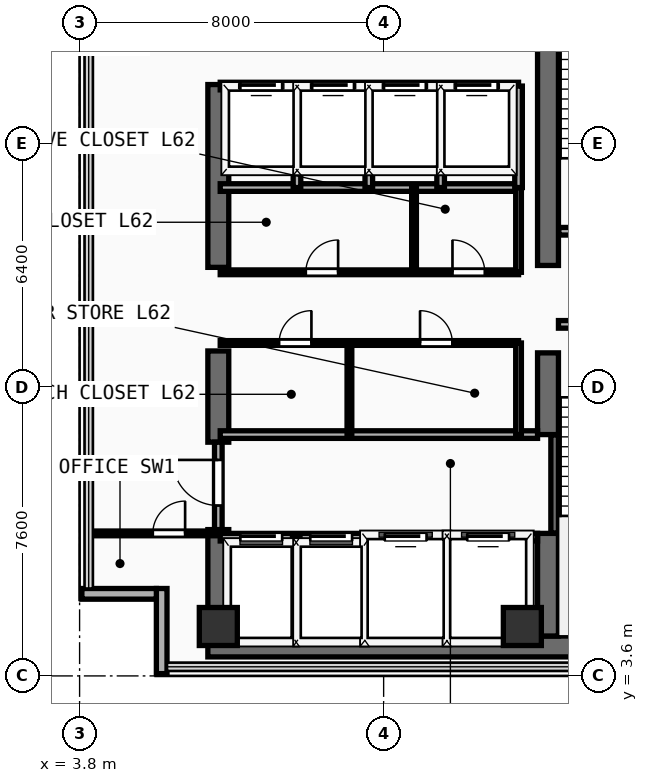
"""IFC4 building model, lengths in metres.
Left out: names, types, materials, properties, quantities, classifications, styles, units other than length and angle.
Written with IfcOpenShell. Run it as: python <this file> out.ifc"""

import sys

from ifc_helpers import new_model, si_unit, direction, frame, frame_2d, origin, origin_2d, place, context, subcontext, project, spatial, rectangle, extrude, element, fill, save


model = new_model("IFC4")
c1 = context("Model", 3, precision=1e-05, world=origin(), true_north=direction((0.0, 1.0)))
c2 = subcontext(c1, "Body", "Model", "MODEL_VIEW")
j1 = project(units=[si_unit("LENGTHUNIT", "METRE"), si_unit("PLANEANGLEUNIT", "RADIAN")], contexts=[c1])
p1 = place(None, origin())
s1 = spatial("IfcSite", under=j1, at=p1, CompositionType="ELEMENT")
p2 = place(p1, origin())
s2 = spatial("IfcBuilding", under=s1, at=p2, CompositionType="ELEMENT")
p3 = place(p2, frame((0.0, 0.0, 242.5)))
s3 = spatial("IfcBuildingStorey", under=s2, at=p3, CompositionType="ELEMENT", Elevation=242.5)
p4 = place(p3, frame((7.175, 4.375, 0.0), z_axis=(0.0, 0.0, 1.0), x_axis=(1.0, 0.0, 0.0)))
e1 = element("IfcWall", 1, at=p4, inside=s3, PredefinedType="SHEAR", context=c2, shape_type="SweptSolid", body=[
    extrude(rectangle(XDim=13.9, YDim=0.55, at=frame_2d((6.95, 0.0))), origin(), (0.0, 0.0, 1.0), 3.56),
])
p5 = place(p3, frame((7.45, 4.65, 0.0), z_axis=(0.0, 0.0, 1.0), x_axis=(0.0, 1.0, 0.0)))
e2 = element("IfcWall", 2, at=p5, inside=s3, PredefinedType="SHEAR", context=c2, shape_type="SweptSolid", body=[
    extrude(rectangle(XDim=2.8, YDim=0.55, at=frame_2d((1.4, 0.0))), origin(), (0.0, 0.0, 1.0), 3.56),
])
p6 = place(p3, frame((7.45, 9.75, 0.0), z_axis=(0.0, 0.0, 1.0), x_axis=(0.0, 1.0, 0.0)))
e3 = element("IfcWall", 3, at=p6, inside=s3, PredefinedType="SHEAR", context=c2, shape_type="SweptSolid", body=[
    extrude(rectangle(XDim=2.4, YDim=0.55, at=frame_2d((1.2, 0.0))), origin(), (0.0, 0.0, 1.0), 3.56),
])
p7 = place(p3, frame((7.45, 14.35, 0.0), z_axis=(0.0, 0.0, 1.0), x_axis=(0.0, 1.0, 0.0)))
e4 = element("IfcWall", 4, at=p7, inside=s3, PredefinedType="SHEAR", context=c2, shape_type="SweptSolid", body=[
    extrude(rectangle(XDim=4.81, YDim=0.55, at=frame_2d((2.405, 0.0))), origin(), (0.0, 0.0, 1.0), 3.56),
])
p8 = place(p3, frame((16.125, 4.65, 0.0), z_axis=(0.0, 0.0, 1.0), x_axis=(0.0, 1.0, 0.0)))
e5 = element("IfcWall", 5, at=p8, inside=s3, PredefinedType="SHEAR", context=c2, shape_type="SweptSolid", body=[
    extrude(rectangle(XDim=2.7, YDim=0.55, at=frame_2d((1.35, 0.0))), origin(), (0.0, 0.0, 1.0), 3.56),
])
p9 = place(p3, frame((16.125, 9.95, 0.0), z_axis=(0.0, 0.0, 1.0), x_axis=(0.0, 1.0, 0.0)))
e6 = element("IfcWall", 6, at=p9, inside=s3, PredefinedType="SHEAR", context=c2, shape_type="SweptSolid", body=[
    extrude(rectangle(XDim=2.15, YDim=0.55, at=frame_2d((1.075, 0.0))), origin(), (0.0, 0.0, 1.0), 3.56),
])
p10 = place(p3, frame((16.125, 14.4, 0.0), z_axis=(0.0, 0.0, 1.0), x_axis=(0.0, 1.0, 0.0)))
e7 = element("IfcWall", 7, at=p10, inside=s3, PredefinedType="SHEAR", context=c2, shape_type="SweptSolid", body=[
    extrude(rectangle(XDim=9.1, YDim=0.55, at=frame_2d((4.55, 0.0))), origin(), (0.0, 0.0, 1.0), 3.56),
])
for number, where, z_axis, x_axis in (
    (8, (7.45, 4.9, 0.0), (0.0, 0.0, 1.0), (1.0, 0.0, 0.0)),
    (9, (15.45, 4.9, 0.0), (0.0, 0.0, 1.0), (1.0, 0.0, 0.0)),
):
    element("IfcColumn", number, at=place(p3, frame(where, z_axis=z_axis, x_axis=x_axis)), inside=s3, PredefinedType="COLUMN", context=c2, shape_type="SweptSolid", body=[
        extrude(rectangle(XDim=1.0, YDim=1.0, at=origin_2d()), origin(), (0.0, 0.0, 1.0), 3.56),
    ])
p11 = place(p3, frame((5.96, 3.66, 0.0), z_axis=(0.0, 0.0, 1.0), x_axis=(0.0, 1.0, 0.0)))
e10 = element("IfcWall", 10, at=p11, inside=s3, PredefinedType="SOLIDWALL", context=c2, shape_type="SweptSolid", body=[
    extrude(rectangle(XDim=2.24, YDim=0.28, at=frame_2d((1.12, 0.0))), origin(), (0.0, 0.0, 1.0), 3.56),
])
p12 = place(p3, frame((3.86, 5.76, 0.0), z_axis=(0.0, 0.0, 1.0), x_axis=(1.0, 0.0, 0.0)))
e11 = element("IfcWall", 11, at=p12, inside=s3, PredefinedType="SOLIDWALL", context=c2, shape_type="SweptSolid", body=[
    extrude(rectangle(XDim=1.96, YDim=0.28, at=frame_2d((0.98, 0.0))), origin(), (0.0, 0.0, 1.0), 3.56),
])
p13 = place(p3, frame((16.3, 7.36, 0.0), z_axis=(0.0, 0.0, 1.0), x_axis=(0.0, 1.0, 0.0)))
e12 = element("IfcWall", 12, at=p13, inside=s3, PredefinedType="SHEAR", context=c2, shape_type="SweptSolid", body=[
    extrude(rectangle(XDim=2.58, YDim=0.2, at=frame_2d((1.29, 0.0))), origin(), (0.0, 0.0, 1.0), 3.56),
])
p14 = place(p3, frame((16.4, 12.85, 0.0), z_axis=(0.0, 0.0, 1.0), x_axis=(1.0, 0.0, 0.0)))
e13 = element("IfcWall", 13, at=p14, inside=s3, PredefinedType="PARTITIONING", context=c2, shape_type="SweptSolid", body=[
    extrude(rectangle(XDim=3.96, YDim=0.2, at=frame_2d((1.98, 0.0))), origin(), (0.0, 0.0, 1.0), 3.56),
])
p15 = place(p14, frame((1.304, 0.0, 0.0)))
e14 = element("IfcOpeningElement", 14, at=p15, cuts=e13, PredefinedType="OPENING", context=c2, shape_type="SweptSolid", body=[
    extrude(rectangle(XDim=1.1, YDim=2.2, at=frame_2d((0.55, 1.1))), frame((0.0, 0.11, 0.0), z_axis=(0.0, -1.0, 0.0), x_axis=(1.0, 0.0, 0.0)), (0.0, 0.0, 1.0), 0.22),
])
p16 = place(p3, frame((16.41, 15.3, 0.0), z_axis=(0.0, 0.0, 1.0), x_axis=(1.0, 0.0, 0.0)))
e15 = element("IfcWall", 15, at=p16, inside=s3, PredefinedType="PARTITIONING", context=c2, shape_type="SweptSolid", body=[
    extrude(rectangle(XDim=3.95, YDim=0.2, at=frame_2d((1.975, 0.0))), origin(), (0.0, 0.0, 1.0), 3.56),
])
p17 = place(p16, frame((1.294, 0.0, 0.0)))
e16 = element("IfcOpeningElement", 16, at=p17, cuts=e15, PredefinedType="OPENING", context=c2, shape_type="SweptSolid", body=[
    extrude(rectangle(XDim=1.1, YDim=2.2, at=frame_2d((0.55, 1.1))), frame((0.0, 0.11, 0.0), z_axis=(0.0, -1.0, 0.0), x_axis=(1.0, 0.0, 0.0)), (0.0, 0.0, 1.0), 0.22),
])
p18 = place(p3, frame((7.5, 7.25, 0.0), z_axis=(0.0, 0.0, 1.0), x_axis=(1.0, 0.0, 0.0)))
e17 = element("IfcWall", 17, at=p18, inside=s3, PredefinedType="PARTITIONING", context=c2, shape_type="SweptSolid", body=[
    extrude(rectangle(XDim=8.35, YDim=0.2, at=frame_2d((4.175, 0.0))), origin(), (0.0, 0.0, 1.0), 3.56),
])
p19 = place(p18, frame((0.53, 0.0, 0.0)))
e18 = element("IfcOpeningElement", 18, at=p19, cuts=e17, PredefinedType="OPENING", context=c2, shape_type="SweptSolid", body=[
    extrude(rectangle(XDim=1.1, YDim=2.2, at=frame_2d((0.55, 1.1))), frame((0.0, 0.11, 0.0), z_axis=(0.0, -1.0, 0.0), x_axis=(1.0, 0.0, 0.0)), (0.0, 0.0, 1.0), 0.22),
])
p20 = place(p18, frame((2.37, 0.0, 0.0)))
e19 = element("IfcOpeningElement", 19, at=p20, cuts=e17, PredefinedType="OPENING", context=c2, shape_type="SweptSolid", body=[
    extrude(rectangle(XDim=1.1, YDim=2.2, at=frame_2d((0.55, 1.1))), frame((0.0, 0.11, 0.0), z_axis=(0.0, -1.0, 0.0), x_axis=(1.0, 0.0, 0.0)), (0.0, 0.0, 1.0), 0.22),
])
p21 = place(p18, frame((4.33, 0.0, 0.0)))
e20 = element("IfcOpeningElement", 20, at=p21, cuts=e17, PredefinedType="OPENING", context=c2, shape_type="SweptSolid", body=[
    extrude(rectangle(XDim=1.1, YDim=2.2, at=frame_2d((0.55, 1.1))), frame((0.0, 0.11, 0.0), z_axis=(0.0, -1.0, 0.0), x_axis=(1.0, 0.0, 0.0)), (0.0, 0.0, 1.0), 0.22),
])
p22 = place(p18, frame((6.5, 0.0, 0.0)))
e21 = element("IfcOpeningElement", 21, at=p22, cuts=e17, PredefinedType="OPENING", context=c2, shape_type="SweptSolid", body=[
    extrude(rectangle(XDim=1.1, YDim=2.2, at=frame_2d((0.55, 1.1))), frame((0.0, 0.11, 0.0), z_axis=(0.0, -1.0, 0.0), x_axis=(1.0, 0.0, 0.0)), (0.0, 0.0, 1.0), 0.22),
])
p23 = place(p3, frame((7.5, 9.95, 0.0), z_axis=(0.0, 0.0, 1.0), x_axis=(1.0, 0.0, 0.0)))
e22 = element("IfcWall", 22, at=p23, inside=s3, PredefinedType="PARTITIONING", context=c2, shape_type="SweptSolid", body=[
    extrude(rectangle(XDim=8.35, YDim=0.2, at=frame_2d((4.175, 0.0))), origin(), (0.0, 0.0, 1.0), 3.56),
])
for number, where, z_axis, x_axis in (
    (23, (9.5, 4.45, 0.0), (0.0, 0.0, 1.0), (0.0, 1.0, 0.0)),
    (24, (11.36, 4.45, 0.0), (0.0, 0.0, 1.0), (0.0, 1.0, 0.0)),
    (25, (13.46, 4.45, 0.0), (0.0, 0.0, 1.0), (0.0, 1.0, 0.0)),
):
    element("IfcWall", number, at=place(p3, frame(where, z_axis=z_axis, x_axis=x_axis)), inside=s3, PredefinedType="PARTITIONING", context=c2, shape_type="SweptSolid", body=[
        extrude(rectangle(XDim=2.8, YDim=0.2, at=frame_2d((1.4, 0.0))), origin(), (0.0, 0.0, 1.0), 3.56),
    ])
p24 = place(p3, frame((7.45, 7.45, 0.0), z_axis=(0.0, 0.0, 1.0), x_axis=(0.0, 1.0, 0.0)))
e26 = element("IfcWall", 26, at=p24, inside=s3, PredefinedType="PARTITIONING", context=c2, shape_type="SweptSolid", body=[
    extrude(rectangle(XDim=2.3, YDim=0.2, at=frame_2d((1.15, 0.0))), origin(), (0.0, 0.0, 1.0), 2.54),
])
p25 = place(p24, frame((0.633, 0.0, 0.0)))
e27 = element("IfcOpeningElement", 27, at=p25, cuts=e26, PredefinedType="OPENING", context=c2, shape_type="SweptSolid", body=[
    extrude(rectangle(XDim=1.2, YDim=2.25, at=frame_2d((0.6, 1.125))), frame((0.0, 0.11, 0.0), z_axis=(0.0, -1.0, 0.0), x_axis=(1.0, 0.0, 0.0)), (0.0, 0.0, 1.0), 0.22),
])
p26 = place(p3, frame((7.5, 16.45, 0.0), z_axis=(0.0, 0.0, 1.0), x_axis=(1.0, 0.0, 0.0)))
e28 = element("IfcWall", 28, at=p26, inside=s3, PredefinedType="PARTITIONING", context=c2, shape_type="SweptSolid", body=[
    extrude(rectangle(XDim=7.85, YDim=0.2, at=frame_2d((3.925, 0.0))), origin(), (0.0, 0.0, 1.0), 3.56),
])
p27 = place(p3, frame((7.5, 12.36, 0.0), z_axis=(0.0, 0.0, 1.0), x_axis=(1.0, 0.0, 0.0)))
e29 = element("IfcWall", 29, at=p27, inside=s3, PredefinedType="PARTITIONING", context=c2, shape_type="SweptSolid", body=[
    extrude(rectangle(XDim=7.85, YDim=0.125, at=frame_2d((3.925, 0.0))), origin(), (0.0, 0.0, 1.0), 3.56),
])
p28 = place(p27, frame((1.55, 0.0, 0.0)))
e30 = element("IfcOpeningElement", 30, at=p28, cuts=e29, PredefinedType="OPENING", context=c2, shape_type="SweptSolid", body=[
    extrude(rectangle(XDim=0.85, YDim=2.15, at=frame_2d((0.425, 1.075))), frame((0.0, 0.073, 0.0), z_axis=(0.0, -1.0, 0.0), x_axis=(1.0, 0.0, 0.0)), (0.0, 0.0, 1.0), 0.145),
])
p29 = place(p27, frame((5.258, 0.0, 0.0)))
e31 = element("IfcOpeningElement", 31, at=p29, cuts=e29, PredefinedType="OPENING", context=c2, shape_type="SweptSolid", body=[
    extrude(rectangle(XDim=0.85, YDim=2.15, at=frame_2d((0.425, 1.075))), frame((0.0, 0.073, 0.0), z_axis=(0.0, -1.0, 0.0), x_axis=(1.0, 0.0, 0.0)), (0.0, 0.0, 1.0), 0.145),
])
p30 = place(p3, frame((7.5, 14.22, 0.0), z_axis=(0.0, 0.0, 1.0), x_axis=(1.0, 0.0, 0.0)))
e32 = element("IfcWall", 32, at=p30, inside=s3, PredefinedType="PARTITIONING", context=c2, shape_type="SweptSolid", body=[
    extrude(rectangle(XDim=7.85, YDim=0.125, at=frame_2d((3.925, 0.0))), origin(), (0.0, 0.0, 1.0), 3.56),
])
p31 = place(p30, frame((2.252, 0.0, 0.0)))
e33 = element("IfcOpeningElement", 33, at=p31, cuts=e32, PredefinedType="OPENING", context=c2, shape_type="SweptSolid", body=[
    extrude(rectangle(XDim=0.85, YDim=2.15, at=frame_2d((0.425, 1.075))), frame((0.0, 0.073, 0.0), z_axis=(0.0, -1.0, 0.0), x_axis=(1.0, 0.0, 0.0)), (0.0, 0.0, 1.0), 0.145),
])
p32 = place(p30, frame((6.111, 0.0, 0.0)))
e34 = element("IfcOpeningElement", 34, at=p32, cuts=e32, PredefinedType="OPENING", context=c2, shape_type="SweptSolid", body=[
    extrude(rectangle(XDim=0.85, YDim=2.15, at=frame_2d((0.425, 1.075))), frame((0.0, 0.073, 0.0), z_axis=(0.0, -1.0, 0.0), x_axis=(1.0, 0.0, 0.0)), (0.0, 0.0, 1.0), 0.145),
])
p33 = place(p3, frame((15.35, 9.95, 0.0), z_axis=(0.0, 0.0, 1.0), x_axis=(0.0, 1.0, 0.0)))
e35 = element("IfcWall", 35, at=p33, inside=s3, PredefinedType="PARTITIONING", context=c2, shape_type="SweptSolid", body=[
    extrude(rectangle(XDim=2.41, YDim=0.15, at=frame_2d((1.205, 0.0))), origin(), (0.0, 0.0, 1.0), 3.56),
])
p34 = place(p3, frame((15.35, 14.22, 0.0), z_axis=(0.0, 0.0, 1.0), x_axis=(0.0, 1.0, 0.0)))
e36 = element("IfcWall", 36, at=p34, inside=s3, PredefinedType="PARTITIONING", context=c2, shape_type="SweptSolid", body=[
    extrude(rectangle(XDim=2.23, YDim=0.15, at=frame_2d((1.115, 0.0))), origin(), (0.0, 0.0, 1.0), 3.56),
])
p35 = place(p3, frame((10.9, 9.95, 0.0), z_axis=(0.0, 0.0, 1.0), x_axis=(0.0, 1.0, 0.0)))
e37 = element("IfcWall", 37, at=p35, inside=s3, PredefinedType="PARTITIONING", context=c2, shape_type="SweptSolid", body=[
    extrude(rectangle(XDim=2.41, YDim=0.125, at=frame_2d((1.205, 0.0))), origin(), (0.0, 0.0, 1.0), 3.56),
])
p36 = place(p3, frame((12.6, 14.22, 0.0), z_axis=(0.0, 0.0, 1.0), x_axis=(0.0, 1.0, 0.0)))
e38 = element("IfcWall", 38, at=p36, inside=s3, PredefinedType="PARTITIONING", context=c2, shape_type="SweptSolid", body=[
    extrude(rectangle(XDim=2.23, YDim=0.125, at=frame_2d((1.115, 0.0))), origin(), (0.0, 0.0, 1.0), 3.56),
])
p37 = place(p3, frame((7.5, 19.12, 0.0), z_axis=(0.0, 0.0, 1.0), x_axis=(1.0, 0.0, 0.0)))
e39 = element("IfcWall", 39, at=p37, inside=s3, PredefinedType="PARTITIONING", context=c2, shape_type="SweptSolid", body=[
    extrude(rectangle(XDim=7.85, YDim=0.2, at=frame_2d((3.925, 0.0))), origin(), (0.0, 0.0, 1.0), 3.56),
])
p38 = place(p37, frame((0.53, 0.0, 0.0)))
e40 = element("IfcOpeningElement", 40, at=p38, cuts=e39, PredefinedType="OPENING", context=c2, shape_type="SweptSolid", body=[
    extrude(rectangle(XDim=1.1, YDim=2.2, at=frame_2d((0.55, 1.1))), frame((0.0, 0.11, 0.0), z_axis=(0.0, -1.0, 0.0), x_axis=(1.0, 0.0, 0.0)), (0.0, 0.0, 1.0), 0.22),
])
p39 = place(p37, frame((2.42, 0.0, 0.0)))
e41 = element("IfcOpeningElement", 41, at=p39, cuts=e39, PredefinedType="OPENING", context=c2, shape_type="SweptSolid", body=[
    extrude(rectangle(XDim=1.1, YDim=2.2, at=frame_2d((0.55, 1.1))), frame((0.0, 0.11, 0.0), z_axis=(0.0, -1.0, 0.0), x_axis=(1.0, 0.0, 0.0)), (0.0, 0.0, 1.0), 0.22),
])
p40 = place(p37, frame((4.31, 0.0, 0.0)))
e42 = element("IfcOpeningElement", 42, at=p40, cuts=e39, PredefinedType="OPENING", context=c2, shape_type="SweptSolid", body=[
    extrude(rectangle(XDim=1.1, YDim=2.2, at=frame_2d((0.55, 1.1))), frame((0.0, 0.11, 0.0), z_axis=(0.0, -1.0, 0.0), x_axis=(1.0, 0.0, 0.0)), (0.0, 0.0, 1.0), 0.22),
])
p41 = place(p37, frame((6.2, 0.0, 0.0)))
e43 = element("IfcOpeningElement", 43, at=p41, cuts=e39, PredefinedType="OPENING", context=c2, shape_type="SweptSolid", body=[
    extrude(rectangle(XDim=1.1, YDim=2.2, at=frame_2d((0.55, 1.1))), frame((0.0, 0.11, 0.0), z_axis=(0.0, -1.0, 0.0), x_axis=(1.0, 0.0, 0.0)), (0.0, 0.0, 1.0), 0.22),
])
for number, where, z_axis, x_axis in (
    (44, (15.35, 16.45, 0.0), (0.0, 0.0, 1.0), (0.0, 1.0, 0.0)),
    (45, (9.52, 16.45, 0.0), (0.0, 0.0, 1.0), (0.0, 1.0, 0.0)),
    (46, (11.41, 16.45, 0.0), (0.0, 0.0, 1.0), (0.0, 1.0, 0.0)),
    (47, (13.3, 16.45, 0.0), (0.0, 0.0, 1.0), (0.0, 1.0, 0.0)),
):
    element("IfcWall", number, at=place(p3, frame(where, z_axis=z_axis, x_axis=x_axis)), inside=s3, PredefinedType="PARTITIONING", context=c2, shape_type="SweptSolid", body=[
        extrude(rectangle(XDim=2.67, YDim=0.2, at=frame_2d((1.335, 0.0))), origin(), (0.0, 0.0, 1.0), 3.56),
    ])
p42 = place(p3, frame((4.04, 7.35, 0.0), z_axis=(0.0, 0.0, 1.0), x_axis=(1.0, 0.0, 0.0)))
e48 = element("IfcWall", 48, at=p42, inside=s3, PredefinedType="PARTITIONING", context=c2, shape_type="SweptSolid", body=[
    extrude(rectangle(XDim=3.36, YDim=0.125, at=frame_2d((1.68, 0.0))), origin(), (0.0, 0.0, 1.0), 3.56),
])
p43 = place(p42, frame((1.687, 0.0, 0.0)))
e49 = element("IfcOpeningElement", 49, at=p43, cuts=e48, PredefinedType="OPENING", context=c2, shape_type="SweptSolid", body=[
    extrude(rectangle(XDim=0.85, YDim=2.15, at=frame_2d((0.425, 1.075))), frame((0.0, 0.073, 0.0), z_axis=(0.0, -1.0, 0.0), x_axis=(1.0, 0.0, 0.0)), (0.0, 0.0, 1.0), 0.145),
])
p44 = place(p19, origin())
e50 = element("IfcDoor", 50, at=p44, inside=s3, OperationType="SLIDING_TO_LEFT", PredefinedType="DOOR", context=c2, shape_type="SweptSolid", body=[
    extrude(rectangle(XDim=1.1, YDim=2.2, at=frame_2d((0.55, 1.1))), frame((0.0, 0.025, 0.0), z_axis=(0.0, -1.0, 0.0), x_axis=(1.0, 0.0, 0.0)), (0.0, 0.0, 1.0), 0.05),
])
fill(e18, e50)
p45 = place(p20, origin())
e51 = element("IfcDoor", 51, at=p45, inside=s3, OperationType="SLIDING_TO_LEFT", PredefinedType="DOOR", context=c2, shape_type="SweptSolid", body=[
    extrude(rectangle(XDim=1.1, YDim=2.2, at=frame_2d((0.55, 1.1))), frame((0.0, 0.025, 0.0), z_axis=(0.0, -1.0, 0.0), x_axis=(1.0, 0.0, 0.0)), (0.0, 0.0, 1.0), 0.05),
])
fill(e19, e51)
p46 = place(p21, origin())
e52 = element("IfcDoor", 52, at=p46, inside=s3, OperationType="SLIDING_TO_LEFT", PredefinedType="DOOR", context=c2, shape_type="SweptSolid", body=[
    extrude(rectangle(XDim=1.1, YDim=2.2, at=frame_2d((0.55, 1.1))), frame((0.0, 0.025, 0.0), z_axis=(0.0, -1.0, 0.0), x_axis=(1.0, 0.0, 0.0)), (0.0, 0.0, 1.0), 0.05),
])
fill(e20, e52)
p47 = place(p22, origin())
e53 = element("IfcDoor", 53, at=p47, inside=s3, OperationType="SLIDING_TO_LEFT", PredefinedType="DOOR", context=c2, shape_type="SweptSolid", body=[
    extrude(rectangle(XDim=1.1, YDim=2.2, at=frame_2d((0.55, 1.1))), frame((0.0, 0.025, 0.0), z_axis=(0.0, -1.0, 0.0), x_axis=(1.0, 0.0, 0.0)), (0.0, 0.0, 1.0), 0.05),
])
fill(e21, e53)
p48 = place(p25, frame((1.2, 0.0, 0.0), z_axis=(0.0, 0.0, 1.0), x_axis=(-1.0, 0.0, 0.0)))
e54 = element("IfcDoor", 54, at=p48, inside=s3, OperationType="SINGLE_SWING_LEFT", PredefinedType="DOOR", context=c2, shape_type="SweptSolid", body=[
    extrude(rectangle(XDim=1.2, YDim=2.25, at=frame_2d((0.6, 1.125))), frame((0.0, 0.025, 0.0), z_axis=(0.0, -1.0, 0.0), x_axis=(1.0, 0.0, 0.0)), (0.0, 0.0, 1.0), 0.05),
])
fill(e27, e54)
p49 = place(p28, origin())
e55 = element("IfcDoor", 55, at=p49, inside=s3, OperationType="SINGLE_SWING_RIGHT", PredefinedType="DOOR", context=c2, shape_type="SweptSolid", body=[
    extrude(rectangle(XDim=0.85, YDim=2.15, at=frame_2d((0.425, 1.075))), frame((0.0, 0.025, 0.0), z_axis=(0.0, -1.0, 0.0), x_axis=(1.0, 0.0, 0.0)), (0.0, 0.0, 1.0), 0.05),
])
fill(e30, e55)
p50 = place(p29, origin())
e56 = element("IfcDoor", 56, at=p50, inside=s3, OperationType="SINGLE_SWING_LEFT", PredefinedType="DOOR", context=c2, shape_type="SweptSolid", body=[
    extrude(rectangle(XDim=0.85, YDim=2.15, at=frame_2d((0.425, 1.075))), frame((0.0, 0.025, 0.0), z_axis=(0.0, -1.0, 0.0), x_axis=(1.0, 0.0, 0.0)), (0.0, 0.0, 1.0), 0.05),
])
fill(e31, e56)
p51 = place(p31, origin())
e57 = element("IfcDoor", 57, at=p51, inside=s3, OperationType="SINGLE_SWING_RIGHT", PredefinedType="DOOR", context=c2, shape_type="SweptSolid", body=[
    extrude(rectangle(XDim=0.85, YDim=2.15, at=frame_2d((0.425, 1.075))), frame((0.0, 0.025, 0.0), z_axis=(0.0, -1.0, 0.0), x_axis=(1.0, 0.0, 0.0)), (0.0, 0.0, 1.0), 0.05),
])
fill(e33, e57)
p52 = place(p32, origin())
e58 = element("IfcDoor", 58, at=p52, inside=s3, OperationType="SINGLE_SWING_LEFT", PredefinedType="DOOR", context=c2, shape_type="SweptSolid", body=[
    extrude(rectangle(XDim=0.85, YDim=2.15, at=frame_2d((0.425, 1.075))), frame((0.0, 0.025, 0.0), z_axis=(0.0, -1.0, 0.0), x_axis=(1.0, 0.0, 0.0)), (0.0, 0.0, 1.0), 0.05),
])
fill(e34, e58)
p53 = place(p38, origin())
e59 = element("IfcDoor", 59, at=p53, inside=s3, OperationType="SLIDING_TO_LEFT", PredefinedType="DOOR", context=c2, shape_type="SweptSolid", body=[
    extrude(rectangle(XDim=1.1, YDim=2.2, at=frame_2d((0.55, 1.1))), frame((0.0, 0.025, 0.0), z_axis=(0.0, -1.0, 0.0), x_axis=(1.0, 0.0, 0.0)), (0.0, 0.0, 1.0), 0.05),
])
fill(e40, e59)
p54 = place(p39, origin())
e60 = element("IfcDoor", 60, at=p54, inside=s3, OperationType="SLIDING_TO_LEFT", PredefinedType="DOOR", context=c2, shape_type="SweptSolid", body=[
    extrude(rectangle(XDim=1.1, YDim=2.2, at=frame_2d((0.55, 1.1))), frame((0.0, 0.025, 0.0), z_axis=(0.0, -1.0, 0.0), x_axis=(1.0, 0.0, 0.0)), (0.0, 0.0, 1.0), 0.05),
])
fill(e41, e60)
p55 = place(p40, origin())
e61 = element("IfcDoor", 61, at=p55, inside=s3, OperationType="SLIDING_TO_LEFT", PredefinedType="DOOR", context=c2, shape_type="SweptSolid", body=[
    extrude(rectangle(XDim=1.1, YDim=2.2, at=frame_2d((0.55, 1.1))), frame((0.0, 0.025, 0.0), z_axis=(0.0, -1.0, 0.0), x_axis=(1.0, 0.0, 0.0)), (0.0, 0.0, 1.0), 0.05),
])
fill(e42, e61)
p56 = place(p41, origin())
e62 = element("IfcDoor", 62, at=p56, inside=s3, OperationType="SLIDING_TO_LEFT", PredefinedType="DOOR", context=c2, shape_type="SweptSolid", body=[
    extrude(rectangle(XDim=1.1, YDim=2.2, at=frame_2d((0.55, 1.1))), frame((0.0, 0.025, 0.0), z_axis=(0.0, -1.0, 0.0), x_axis=(1.0, 0.0, 0.0)), (0.0, 0.0, 1.0), 0.05),
])
fill(e43, e62)
p57 = place(p43, origin())
e63 = element("IfcDoor", 63, at=p57, inside=s3, OperationType="SINGLE_SWING_RIGHT", PredefinedType="DOOR", context=c2, shape_type="SweptSolid", body=[
    extrude(rectangle(XDim=0.85, YDim=2.15, at=frame_2d((0.425, 1.075))), frame((0.0, 0.025, 0.0), z_axis=(0.0, -1.0, 0.0), x_axis=(1.0, 0.0, 0.0)), (0.0, 0.0, 1.0), 0.05),
])
fill(e49, e63)
save(model, sys.argv[1])
